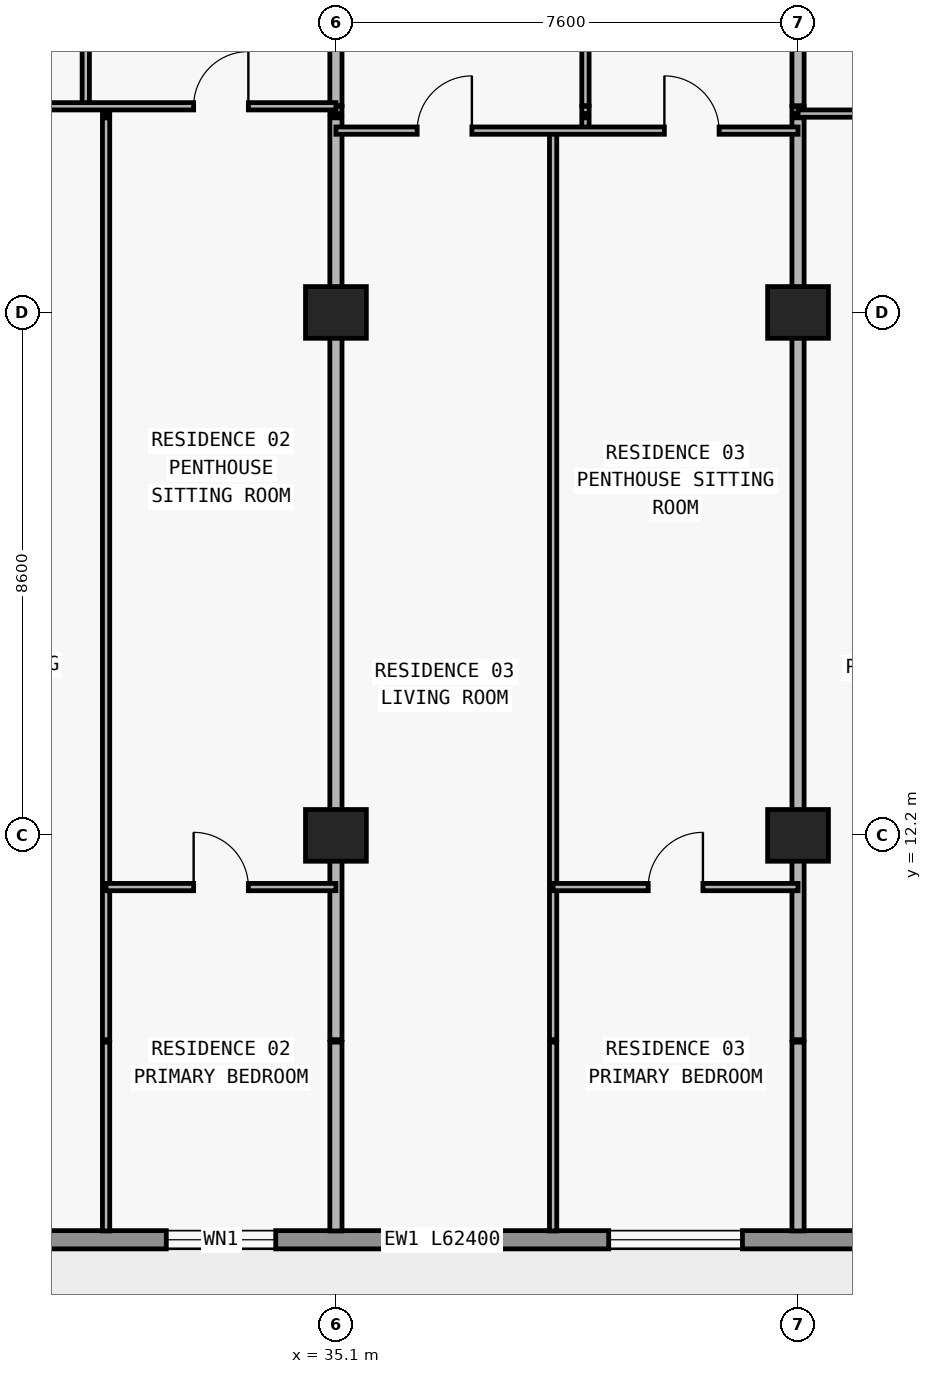
"""IFC4 building model, lengths in metres.
Left out: names, types, materials, properties, quantities, classifications, styles, units other than length and angle.
Written with IfcOpenShell. Run it as: python <this file> out.ifc"""

import sys

from ifc_helpers import new_model, si_unit, direction, frame, frame_2d, origin, origin_2d, place, context, subcontext, project, spatial, rectangle, extrude, element, fill, save


model = new_model("IFC4")
c1 = context("Model", 3, precision=1e-05, world=origin(), true_north=direction((0.0, 1.0)))
c2 = subcontext(c1, "Body", "Model", "MODEL_VIEW")
j1 = project(units=[si_unit("LENGTHUNIT", "METRE"), si_unit("PLANEANGLEUNIT", "RADIAN")], contexts=[c1])
p1 = place(None, origin())
s1 = spatial("IfcSite", under=j1, at=p1, CompositionType="ELEMENT")
p2 = place(p1, origin())
s2 = spatial("IfcBuilding", under=s1, at=p2, CompositionType="ELEMENT")
p3 = place(p2, frame((0.0, 0.0, 91.2)))
s3 = spatial("IfcBuildingStorey", under=s2, at=p3, CompositionType="ELEMENT", Elevation=91.2)
for number, where, z_axis, x_axis in (
    (1, (35.1, 12.2, 0.0), (0.0, 0.0, 1.0), (1.0, 0.0, 0.0)),
    (2, (42.7, 12.2, 0.0), (0.0, 0.0, 1.0), (1.0, 0.0, 0.0)),
    (3, (35.1, 20.8, 0.0), (0.0, 0.0, 1.0), (1.0, 0.0, 0.0)),
    (4, (42.7, 20.8, 0.0), (0.0, 0.0, 1.0), (1.0, 0.0, 0.0)),
):
    element("IfcColumn", number, at=place(p3, frame(where, z_axis=z_axis, x_axis=x_axis)), inside=s3, PredefinedType="COLUMN", context=c2, shape_type="SweptSolid", body=[
        extrude(rectangle(XDim=1.0, YDim=0.85, at=origin_2d()), origin(), (0.0, 0.0, 1.0), 3.05),
    ])
p4 = place(p3, frame((70.1, 5.55, 0.0), z_axis=(0.0, 0.0, 1.0), x_axis=(-1.0, 0.0, 0.0)))
e5 = element("IfcWall", 5, at=p4, inside=s3, PredefinedType="STANDARD", context=c2, shape_type="SweptSolid", body=[
    extrude(rectangle(XDim=62.4, YDim=0.3, at=frame_2d((31.2, 0.0))), origin(), (0.0, 0.0, 1.0), 3.05),
])
p5 = place(p4, frame((57.29, 0.0, 0.0)))
e6 = element("IfcOpeningElement", 6, at=p5, cuts=e5, PredefinedType="OPENING", context=c2, shape_type="SweptSolid", body=[
    extrude(rectangle(XDim=2.0, YDim=2.3, at=frame_2d((1.0, 1.15))), frame((0.0, 0.16, 0.0), z_axis=(0.0, -1.0, 0.0), x_axis=(1.0, 0.0, 0.0)), (0.0, 0.0, 1.0), 0.32),
])
p6 = place(p4, frame((52.61, 0.0, 0.65)))
e7 = element("IfcOpeningElement", 7, at=p6, cuts=e5, PredefinedType="OPENING", context=c2, shape_type="SweptSolid", body=[
    extrude(rectangle(XDim=2.6, YDim=1.85, at=frame_2d((1.3, 0.925))), frame((0.0, 0.16, 0.0), z_axis=(0.0, -1.0, 0.0), x_axis=(1.0, 0.0, 0.0)), (0.0, 0.0, 1.0), 0.32),
])
p7 = place(p4, frame((46.5, 0.0, 0.85)))
e8 = element("IfcOpeningElement", 8, at=p7, cuts=e5, PredefinedType="OPENING", context=c2, shape_type="SweptSolid", body=[
    extrude(rectangle(XDim=2.2, YDim=1.55, at=frame_2d((1.1, 0.775))), frame((0.0, 0.16, 0.0), z_axis=(0.0, -1.0, 0.0), x_axis=(1.0, 0.0, 0.0)), (0.0, 0.0, 1.0), 0.32),
])
p8 = place(p4, frame((40.09, 0.0, 0.0)))
e9 = element("IfcOpeningElement", 9, at=p8, cuts=e5, PredefinedType="OPENING", context=c2, shape_type="SweptSolid", body=[
    extrude(rectangle(XDim=2.0, YDim=2.3, at=frame_2d((1.0, 1.15))), frame((0.0, 0.16, 0.0), z_axis=(0.0, -1.0, 0.0), x_axis=(1.0, 0.0, 0.0)), (0.0, 0.0, 1.0), 0.32),
])
p9 = place(p4, frame((35.99, 0.0, 0.85)))
e10 = element("IfcOpeningElement", 10, at=p9, cuts=e5, PredefinedType="OPENING", context=c2, shape_type="SweptSolid", body=[
    extrude(rectangle(XDim=1.8, YDim=1.55, at=frame_2d((0.9, 0.775))), frame((0.0, 0.16, 0.0), z_axis=(0.0, -1.0, 0.0), x_axis=(1.0, 0.0, 0.0)), (0.0, 0.0, 1.0), 0.32),
])
p10 = place(p4, frame((28.314, 0.0, 0.85)))
e11 = element("IfcOpeningElement", 11, at=p10, cuts=e5, PredefinedType="OPENING", context=c2, shape_type="SweptSolid", body=[
    extrude(rectangle(XDim=2.2, YDim=1.55, at=frame_2d((1.1, 0.775))), frame((0.0, 0.16, 0.0), z_axis=(0.0, -1.0, 0.0), x_axis=(1.0, 0.0, 0.0)), (0.0, 0.0, 1.0), 0.32),
])
p11 = place(p4, frame((24.09, 0.0, 0.0)))
e12 = element("IfcOpeningElement", 12, at=p11, cuts=e5, PredefinedType="OPENING", context=c2, shape_type="SweptSolid", body=[
    extrude(rectangle(XDim=2.0, YDim=2.3, at=frame_2d((1.0, 1.15))), frame((0.0, 0.16, 0.0), z_axis=(0.0, -1.0, 0.0), x_axis=(1.0, 0.0, 0.0)), (0.0, 0.0, 1.0), 0.32),
])
p12 = place(p4, frame((19.99, 0.0, 0.85)))
e13 = element("IfcOpeningElement", 13, at=p12, cuts=e5, PredefinedType="OPENING", context=c2, shape_type="SweptSolid", body=[
    extrude(rectangle(XDim=1.8, YDim=1.55, at=frame_2d((0.9, 0.775))), frame((0.0, 0.16, 0.0), z_axis=(0.0, -1.0, 0.0), x_axis=(1.0, 0.0, 0.0)), (0.0, 0.0, 1.0), 0.32),
])
p13 = place(p4, frame((16.09, 0.0, 0.0)))
e14 = element("IfcOpeningElement", 14, at=p13, cuts=e5, PredefinedType="OPENING", context=c2, shape_type="SweptSolid", body=[
    extrude(rectangle(XDim=2.0, YDim=2.3, at=frame_2d((1.0, 1.15))), frame((0.0, 0.16, 0.0), z_axis=(0.0, -1.0, 0.0), x_axis=(1.0, 0.0, 0.0)), (0.0, 0.0, 1.0), 0.32),
])
p14 = place(p4, frame((11.41, 0.0, 0.65)))
e15 = element("IfcOpeningElement", 15, at=p14, cuts=e5, PredefinedType="OPENING", context=c2, shape_type="SweptSolid", body=[
    extrude(rectangle(XDim=2.6, YDim=1.85, at=frame_2d((1.3, 0.925))), frame((0.0, 0.16, 0.0), z_axis=(0.0, -1.0, 0.0), x_axis=(1.0, 0.0, 0.0)), (0.0, 0.0, 1.0), 0.32),
])
p15 = place(p4, frame((5.3, 0.0, 0.85)))
e16 = element("IfcOpeningElement", 16, at=p15, cuts=e5, PredefinedType="OPENING", context=c2, shape_type="SweptSolid", body=[
    extrude(rectangle(XDim=2.2, YDim=1.55, at=frame_2d((1.1, 0.775))), frame((0.0, 0.16, 0.0), z_axis=(0.0, -1.0, 0.0), x_axis=(1.0, 0.0, 0.0)), (0.0, 0.0, 1.0), 0.32),
])
p16 = place(p3, frame((30.986, 24.2, 0.0), z_axis=(0.0, 0.0, 1.0), x_axis=(0.0, 1.0, 0.0)))
e17 = element("IfcWall", 17, at=p16, inside=s3, PredefinedType="PARTITIONING", context=c2, shape_type="SweptSolid", body=[
    extrude(rectangle(XDim=5.14, YDim=0.12, at=frame_2d((2.57, 0.0))), origin(), (0.0, 0.0, 1.0), 3.05),
])
p17 = place(p16, frame((2.12, 0.0, 0.0)))
e18 = element("IfcOpeningElement", 18, at=p17, cuts=e17, PredefinedType="OPENING", context=c2, shape_type="SweptSolid", body=[
    extrude(rectangle(XDim=0.9, YDim=2.15, at=frame_2d((0.45, 1.075))), frame((0.0, 0.07, 0.0), z_axis=(0.0, -1.0, 0.0), x_axis=(1.0, 0.0, 0.0)), (0.0, 0.0, 1.0), 0.14),
])
p18 = place(p3, frame((31.32, 5.695, 0.0), z_axis=(0.0, 0.0, 1.0), x_axis=(0.0, 1.0, 0.0)))
e19 = element("IfcWall", 19, at=p18, inside=s3, PredefinedType="PARTITIONING", context=c2, shape_type="SweptSolid", body=[
    extrude(rectangle(XDim=3.105, YDim=0.12, at=frame_2d((1.552, 0.0))), origin(), (0.0, 0.0, 1.0), 3.05),
])
p19 = place(p3, frame((31.32, 8.84, 0.0), z_axis=(0.0, 0.0, 1.0), x_axis=(0.0, 1.0, 0.0)))
e20 = element("IfcWall", 20, at=p19, inside=s3, PredefinedType="PARTITIONING", context=c2, shape_type="SweptSolid", body=[
    extrude(rectangle(XDim=15.16, YDim=0.12, at=frame_2d((7.58, 0.0))), origin(), (0.0, 0.0, 1.0), 3.05),
])
p20 = place(p3, frame((31.32, 24.07, 0.0), z_axis=(0.0, 0.0, 1.0), x_axis=(0.0, 1.0, 0.0)))
e21 = element("IfcWall", 21, at=p20, inside=s3, PredefinedType="PARTITIONING", context=c2, shape_type="SweptSolid", body=[
    extrude(rectangle(XDim=0.12, YDim=0.12, at=frame_2d((0.06, 0.0))), origin(), (0.0, 0.0, 1.0), 3.05),
])
p21 = place(p3, frame((35.1, 5.695, 0.0), z_axis=(0.0, 0.0, 1.0), x_axis=(0.0, 1.0, 0.0)))
e22 = element("IfcWall", 22, at=p21, inside=s3, PredefinedType="PARTITIONING", context=c2, shape_type="SweptSolid", body=[
    extrude(rectangle(XDim=3.105, YDim=0.2, at=frame_2d((1.552, 0.0))), origin(), (0.0, 0.0, 1.0), 3.05),
])
p22 = place(p3, frame((35.1, 8.84, 0.0), z_axis=(0.0, 0.0, 1.0), x_axis=(0.0, 1.0, 0.0)))
e23 = element("IfcWall", 23, at=p22, inside=s3, PredefinedType="PARTITIONING", context=c2, shape_type="SweptSolid", body=[
    extrude(rectangle(XDim=15.16, YDim=0.2, at=frame_2d((7.58, 0.0))), origin(), (0.0, 0.0, 1.0), 2.174),
])
p23 = place(p3, frame((35.1, 24.07, 0.0), z_axis=(0.0, 0.0, 1.0), x_axis=(0.0, 1.0, 0.0)))
e24 = element("IfcWall", 24, at=p23, inside=s3, PredefinedType="PARTITIONING", context=c2, shape_type="SweptSolid", body=[
    extrude(rectangle(XDim=0.12, YDim=0.2, at=frame_2d((0.06, 0.0))), origin(), (0.0, 0.0, 1.0), 2.174),
])
p24 = place(p3, frame((35.1, 24.2, 0.0), z_axis=(0.0, 0.0, 1.0), x_axis=(0.0, 1.0, 0.0)))
e25 = element("IfcWall", 25, at=p24, inside=s3, PredefinedType="PARTITIONING", context=c2, shape_type="SweptSolid", body=[
    extrude(rectangle(XDim=5.14, YDim=0.2, at=frame_2d((2.57, 0.0))), origin(), (0.0, 0.0, 1.0), 2.174),
])
p25 = place(p3, frame((38.672, 5.695, 0.0), z_axis=(0.0, 0.0, 1.0), x_axis=(0.0, 1.0, 0.0)))
e26 = element("IfcWall", 26, at=p25, inside=s3, PredefinedType="PARTITIONING", context=c2, shape_type="SweptSolid", body=[
    extrude(rectangle(XDim=3.105, YDim=0.12, at=frame_2d((1.552, 0.0))), origin(), (0.0, 0.0, 1.0), 3.05),
])
p26 = place(p3, frame((38.672, 8.84, 0.0), z_axis=(0.0, 0.0, 1.0), x_axis=(0.0, 1.0, 0.0)))
e27 = element("IfcWall", 27, at=p26, inside=s3, PredefinedType="PARTITIONING", context=c2, shape_type="SweptSolid", body=[
    extrude(rectangle(XDim=14.95, YDim=0.12, at=frame_2d((7.475, 0.0))), origin(), (0.0, 0.0, 1.0), 3.05),
])
p27 = place(p3, frame((39.204, 23.79, 0.0), z_axis=(0.0, 0.0, 1.0), x_axis=(0.0, 1.0, 0.0)))
e28 = element("IfcWall", 28, at=p27, inside=s3, PredefinedType="PARTITIONING", context=c2, shape_type="SweptSolid", body=[
    extrude(rectangle(XDim=0.21, YDim=0.12, at=frame_2d((0.105, 0.0))), origin(), (0.0, 0.0, 1.0), 3.05),
])
p28 = place(p3, frame((39.204, 24.07, 0.0), z_axis=(0.0, 0.0, 1.0), x_axis=(0.0, 1.0, 0.0)))
e29 = element("IfcWall", 29, at=p28, inside=s3, PredefinedType="PARTITIONING", context=c2, shape_type="SweptSolid", body=[
    extrude(rectangle(XDim=0.12, YDim=0.12, at=frame_2d((0.06, 0.0))), origin(), (0.0, 0.0, 1.0), 3.05),
])
p29 = place(p3, frame((39.204, 24.2, 0.0), z_axis=(0.0, 0.0, 1.0), x_axis=(0.0, 1.0, 0.0)))
e30 = element("IfcWall", 30, at=p29, inside=s3, PredefinedType="PARTITIONING", context=c2, shape_type="SweptSolid", body=[
    extrude(rectangle(XDim=4.74, YDim=0.12, at=frame_2d((2.37, 0.0))), origin(), (0.0, 0.0, 1.0), 3.05),
])
p30 = place(p29, frame((1.92, 0.0, 0.0)))
e31 = element("IfcOpeningElement", 31, at=p30, cuts=e30, PredefinedType="OPENING", context=c2, shape_type="SweptSolid", body=[
    extrude(rectangle(XDim=0.9, YDim=2.15, at=frame_2d((0.45, 1.075))), frame((0.0, 0.07, 0.0), z_axis=(0.0, -1.0, 0.0), x_axis=(1.0, 0.0, 0.0)), (0.0, 0.0, 1.0), 0.14),
])
p31 = place(p3, frame((42.7, 5.695, 0.0), z_axis=(0.0, 0.0, 1.0), x_axis=(0.0, 1.0, 0.0)))
e32 = element("IfcWall", 32, at=p31, inside=s3, PredefinedType="PARTITIONING", context=c2, shape_type="SweptSolid", body=[
    extrude(rectangle(XDim=3.105, YDim=0.2, at=frame_2d((1.552, 0.0))), origin(), (0.0, 0.0, 1.0), 3.05),
])
p32 = place(p3, frame((42.7, 8.84, 0.0), z_axis=(0.0, 0.0, 1.0), x_axis=(0.0, 1.0, 0.0)))
e33 = element("IfcWall", 33, at=p32, inside=s3, PredefinedType="PARTITIONING", context=c2, shape_type="SweptSolid", body=[
    extrude(rectangle(XDim=15.16, YDim=0.2, at=frame_2d((7.58, 0.0))), origin(), (0.0, 0.0, 1.0), 2.174),
])
p33 = place(p3, frame((42.7, 24.07, 0.0), z_axis=(0.0, 0.0, 1.0), x_axis=(0.0, 1.0, 0.0)))
e34 = element("IfcWall", 34, at=p33, inside=s3, PredefinedType="PARTITIONING", context=c2, shape_type="SweptSolid", body=[
    extrude(rectangle(XDim=0.12, YDim=0.2, at=frame_2d((0.06, 0.0))), origin(), (0.0, 0.0, 1.0), 2.174),
])
p34 = place(p3, frame((42.7, 24.2, 0.0), z_axis=(0.0, 0.0, 1.0), x_axis=(0.0, 1.0, 0.0)))
e35 = element("IfcWall", 35, at=p34, inside=s3, PredefinedType="PARTITIONING", context=c2, shape_type="SweptSolid", body=[
    extrude(rectangle(XDim=5.14, YDim=0.2, at=frame_2d((2.57, 0.0))), origin(), (0.0, 0.0, 1.0), 2.174),
])
p35 = place(p3, frame((31.32, 11.35, 0.0), z_axis=(0.0, 0.0, 1.0), x_axis=(1.0, 0.0, 0.0)))
e36 = element("IfcWall", 36, at=p35, inside=s3, PredefinedType="PARTITIONING", context=c2, shape_type="SweptSolid", body=[
    extrude(rectangle(XDim=3.78, YDim=0.12, at=frame_2d((1.89, 0.0))), origin(), (0.0, 0.0, 1.0), 3.05),
])
p36 = place(p35, frame((1.44, 0.0, 0.0)))
e37 = element("IfcOpeningElement", 37, at=p36, cuts=e36, PredefinedType="OPENING", context=c2, shape_type="SweptSolid", body=[
    extrude(rectangle(XDim=0.9, YDim=2.15, at=frame_2d((0.45, 1.075))), frame((0.0, 0.07, 0.0), z_axis=(0.0, -1.0, 0.0), x_axis=(1.0, 0.0, 0.0)), (0.0, 0.0, 1.0), 0.14),
])
p37 = place(p3, frame((38.672, 11.35, 0.0), z_axis=(0.0, 0.0, 1.0), x_axis=(1.0, 0.0, 0.0)))
e38 = element("IfcWall", 38, at=p37, inside=s3, PredefinedType="PARTITIONING", context=c2, shape_type="SweptSolid", body=[
    extrude(rectangle(XDim=4.028, YDim=0.12, at=frame_2d((2.014, 0.0))), origin(), (0.0, 0.0, 1.0), 3.05),
])
p38 = place(p37, frame((1.564, 0.0, 0.0)))
e39 = element("IfcOpeningElement", 39, at=p38, cuts=e38, PredefinedType="OPENING", context=c2, shape_type="SweptSolid", body=[
    extrude(rectangle(XDim=0.9, YDim=2.15, at=frame_2d((0.45, 1.075))), frame((0.0, 0.07, 0.0), z_axis=(0.0, -1.0, 0.0), x_axis=(1.0, 0.0, 0.0)), (0.0, 0.0, 1.0), 0.14),
])
p39 = place(p3, frame((35.1, 23.79, 0.0), z_axis=(0.0, 0.0, 1.0), x_axis=(1.0, 0.0, 0.0)))
e40 = element("IfcWall", 40, at=p39, inside=s3, PredefinedType="PARTITIONING", context=c2, shape_type="SweptSolid", body=[
    extrude(rectangle(XDim=7.6, YDim=0.12, at=frame_2d((3.8, 0.0))), origin(), (0.0, 0.0, 1.0), 3.05),
])
p40 = place(p39, frame((1.336, 0.0, 0.0)))
e41 = element("IfcOpeningElement", 41, at=p40, cuts=e40, PredefinedType="OPENING", context=c2, shape_type="SweptSolid", body=[
    extrude(rectangle(XDim=0.9, YDim=2.15, at=frame_2d((0.45, 1.075))), frame((0.0, 0.07, 0.0), z_axis=(0.0, -1.0, 0.0), x_axis=(1.0, 0.0, 0.0)), (0.0, 0.0, 1.0), 0.14),
])
p41 = place(p39, frame((5.402, 0.0, 0.0)))
e42 = element("IfcOpeningElement", 42, at=p41, cuts=e40, PredefinedType="OPENING", context=c2, shape_type="SweptSolid", body=[
    extrude(rectangle(XDim=0.9, YDim=2.15, at=frame_2d((0.45, 1.075))), frame((0.0, 0.07, 0.0), z_axis=(0.0, -1.0, 0.0), x_axis=(1.0, 0.0, 0.0)), (0.0, 0.0, 1.0), 0.14),
])
p42 = place(p3, frame((42.7, 24.07, 0.0), z_axis=(0.0, 0.0, 1.0), x_axis=(1.0, 0.0, 0.0)))
e43 = element("IfcWall", 43, at=p42, inside=s3, PredefinedType="PARTITIONING", context=c2, shape_type="SweptSolid", body=[
    extrude(rectangle(XDim=8.13, YDim=0.12, at=frame_2d((4.065, 0.0))), origin(), (0.0, 0.0, 1.0), 3.05),
])
p43 = place(p42, frame((1.86, 0.0, 0.0)))
e44 = element("IfcOpeningElement", 44, at=p43, cuts=e43, PredefinedType="OPENING", context=c2, shape_type="SweptSolid", body=[
    extrude(rectangle(XDim=0.9, YDim=2.15, at=frame_2d((0.45, 1.075))), frame((0.0, 0.07, 0.0), z_axis=(0.0, -1.0, 0.0), x_axis=(1.0, 0.0, 0.0)), (0.0, 0.0, 1.0), 0.14),
])
p44 = place(p42, frame((6.008, 0.0, 0.0)))
e45 = element("IfcOpeningElement", 45, at=p44, cuts=e43, PredefinedType="OPENING", context=c2, shape_type="SweptSolid", body=[
    extrude(rectangle(XDim=0.9, YDim=2.15, at=frame_2d((0.45, 1.075))), frame((0.0, 0.07, 0.0), z_axis=(0.0, -1.0, 0.0), x_axis=(1.0, 0.0, 0.0)), (0.0, 0.0, 1.0), 0.14),
])
p45 = place(p3, frame((26.97, 24.19, 0.0), z_axis=(0.0, 0.0, 1.0), x_axis=(1.0, 0.0, 0.0)))
e46 = element("IfcWall", 46, at=p45, inside=s3, PredefinedType="PARTITIONING", context=c2, shape_type="SweptSolid", body=[
    extrude(rectangle(XDim=8.13, YDim=0.12, at=frame_2d((4.065, 0.0))), origin(), (0.0, 0.0, 1.0), 3.05),
])
p46 = place(p45, frame((1.558, 0.0, 0.0)))
e47 = element("IfcOpeningElement", 47, at=p46, cuts=e46, PredefinedType="OPENING", context=c2, shape_type="SweptSolid", body=[
    extrude(rectangle(XDim=0.9, YDim=2.15, at=frame_2d((0.45, 1.075))), frame((0.0, 0.07, 0.0), z_axis=(0.0, -1.0, 0.0), x_axis=(1.0, 0.0, 0.0)), (0.0, 0.0, 1.0), 0.14),
])
p47 = place(p45, frame((5.79, 0.0, 0.0)))
e48 = element("IfcOpeningElement", 48, at=p47, cuts=e46, PredefinedType="OPENING", context=c2, shape_type="SweptSolid", body=[
    extrude(rectangle(XDim=0.9, YDim=2.15, at=frame_2d((0.45, 1.075))), frame((0.0, 0.07, 0.0), z_axis=(0.0, -1.0, 0.0), x_axis=(1.0, 0.0, 0.0)), (0.0, 0.0, 1.0), 0.14),
])
p48 = place(p9, origin())
e49 = element("IfcWindow", 49, at=p48, inside=s3, PartitioningType="SINGLE_PANEL", PredefinedType="WINDOW", context=c2, shape_type="SweptSolid", body=[
    extrude(rectangle(XDim=1.8, YDim=1.55, at=frame_2d((0.9, 0.775))), frame((0.0, 0.03, 0.0), z_axis=(0.0, -1.0, 0.0), x_axis=(1.0, 0.0, 0.0)), (0.0, 0.0, 1.0), 0.06),
])
fill(e10, e49)
p49 = place(p10, origin())
e50 = element("IfcWindow", 50, at=p49, inside=s3, PartitioningType="SINGLE_PANEL", PredefinedType="WINDOW", context=c2, shape_type="SweptSolid", body=[
    extrude(rectangle(XDim=2.2, YDim=1.55, at=frame_2d((1.1, 0.775))), frame((0.0, 0.03, 0.0), z_axis=(0.0, -1.0, 0.0), x_axis=(1.0, 0.0, 0.0)), (0.0, 0.0, 1.0), 0.06),
])
fill(e11, e50)
p50 = place(p47, origin())
e51 = element("IfcDoor", 51, at=p50, inside=s3, OperationType="SINGLE_SWING_RIGHT", PredefinedType="DOOR", context=c2, shape_type="SweptSolid", body=[
    extrude(rectangle(XDim=0.9, YDim=2.15, at=frame_2d((0.45, 1.075))), frame((0.0, 0.025, 0.0), z_axis=(0.0, -1.0, 0.0), x_axis=(1.0, 0.0, 0.0)), (0.0, 0.0, 1.0), 0.05),
])
fill(e48, e51)
p51 = place(p36, origin())
e52 = element("IfcDoor", 52, at=p51, inside=s3, OperationType="SINGLE_SWING_LEFT", PredefinedType="DOOR", context=c2, shape_type="SweptSolid", body=[
    extrude(rectangle(XDim=0.9, YDim=2.15, at=frame_2d((0.45, 1.075))), frame((0.0, 0.025, 0.0), z_axis=(0.0, -1.0, 0.0), x_axis=(1.0, 0.0, 0.0)), (0.0, 0.0, 1.0), 0.05),
])
fill(e37, e52)
p52 = place(p40, origin())
e53 = element("IfcDoor", 53, at=p52, inside=s3, OperationType="SINGLE_SWING_RIGHT", PredefinedType="DOOR", context=c2, shape_type="SweptSolid", body=[
    extrude(rectangle(XDim=0.9, YDim=2.15, at=frame_2d((0.45, 1.075))), frame((0.0, 0.025, 0.0), z_axis=(0.0, -1.0, 0.0), x_axis=(1.0, 0.0, 0.0)), (0.0, 0.0, 1.0), 0.05),
])
fill(e41, e53)
p53 = place(p41, origin())
e54 = element("IfcDoor", 54, at=p53, inside=s3, OperationType="SINGLE_SWING_LEFT", PredefinedType="DOOR", context=c2, shape_type="SweptSolid", body=[
    extrude(rectangle(XDim=0.9, YDim=2.15, at=frame_2d((0.45, 1.075))), frame((0.0, 0.025, 0.0), z_axis=(0.0, -1.0, 0.0), x_axis=(1.0, 0.0, 0.0)), (0.0, 0.0, 1.0), 0.05),
])
fill(e42, e54)
p54 = place(p38, origin())
e55 = element("IfcDoor", 55, at=p54, inside=s3, OperationType="SINGLE_SWING_RIGHT", PredefinedType="DOOR", context=c2, shape_type="SweptSolid", body=[
    extrude(rectangle(XDim=0.9, YDim=2.15, at=frame_2d((0.45, 1.075))), frame((0.0, 0.025, 0.0), z_axis=(0.0, -1.0, 0.0), x_axis=(1.0, 0.0, 0.0)), (0.0, 0.0, 1.0), 0.05),
])
fill(e39, e55)
save(model, sys.argv[1])
